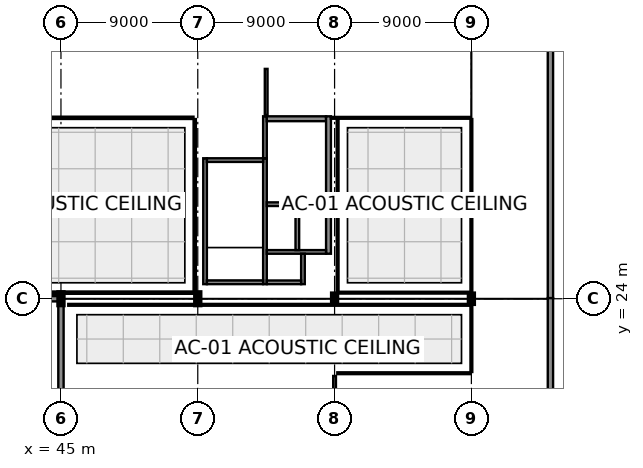
"""IFC4 building model, lengths in metres.
Left out: names, types, materials, properties, quantities, classifications, styles, units other than length and angle.
Written with IfcOpenShell. Run it as: python <this file> out.ifc"""

import sys

from ifc_helpers import new_model, si_unit, direction, frame, frame_2d, origin, origin_2d, place, context, subcontext, project, spatial, rectangle, i_section, extrude, element, fill, save


model = new_model("IFC4")
c1 = context("Model", 3, precision=1e-05, world=origin(), true_north=direction((0.0, 1.0)))
c2 = subcontext(c1, "Body", "Model", "MODEL_VIEW")
j1 = project(units=[si_unit("LENGTHUNIT", "METRE"), si_unit("PLANEANGLEUNIT", "RADIAN")], contexts=[c1])
p1 = place(None, origin())
s1 = spatial("IfcSite", under=j1, at=p1, CompositionType="ELEMENT")
p2 = place(p1, origin())
s2 = spatial("IfcBuilding", under=s1, at=p2, CompositionType="ELEMENT")
p3 = place(p2, origin())
s3 = spatial("IfcBuildingStorey", under=s2, at=p3, CompositionType="ELEMENT", Elevation=0.0)
for number, where, z_axis, x_axis in (
    (1, (45.0, 24.0, 0.0), (0.0, 0.0, 1.0), (1.0, 0.0, 0.0)),
    (2, (54.0, 24.0, 0.0), (0.0, 0.0, 1.0), (0.0, 1.0, 0.0)),
):
    element("IfcColumn", number, at=place(p3, frame(where, z_axis=z_axis, x_axis=x_axis)), inside=s3, PredefinedType="COLUMN", context=c2, shape_type="SweptSolid", body=[
        extrude(i_section(OverallWidth=0.303, OverallDepth=0.814, WebThickness=0.021, FlangeThickness=0.04, at=origin_2d()), origin(), (0.0, 0.0, 1.0), 5.4),
    ])
for number, where, z_axis, x_axis in (
    (3, (63.0, 24.0, 0.0), (0.0, 0.0, 1.0), (1.0, 0.0, 0.0)),
    (4, (72.0, 24.0, 0.0), (0.0, 0.0, 1.0), (1.0, 0.0, 0.0)),
):
    element("IfcColumn", number, at=place(p3, frame(where, z_axis=z_axis, x_axis=x_axis)), inside=s3, PredefinedType="COLUMN", context=c2, shape_type="SweptSolid", body=[
        extrude(i_section(OverallWidth=0.3, OverallDepth=0.65, WebThickness=0.016, FlangeThickness=0.031, at=origin_2d()), origin(), (0.0, 0.0, 1.0), 5.4),
    ])
p4 = place(p3, frame((35.99, 24.0, 0.0), z_axis=(0.0, 0.0, 1.0), x_axis=(1.0, 0.0, 0.0)))
e5 = element("IfcWall", 5, at=p4, inside=s3, PredefinedType="SOLIDWALL", context=c2, shape_type="SweptSolid", body=[
    extrude(rectangle(XDim=9.002, YDim=0.35, at=frame_2d((4.501, 0.0))), origin(), (0.0, 0.0, 1.0), 4.047),
])
p5 = place(p4, frame((1.521, 0.0, 0.85)))
e6 = element("IfcOpeningElement", 6, at=p5, cuts=e5, PredefinedType="OPENING", context=c2, shape_type="SweptSolid", body=[
    extrude(rectangle(XDim=2.0, YDim=2.0, at=frame_2d((1.0, 1.0))), frame((0.0, 0.19, 0.0), z_axis=(0.0, -1.0, 0.0), x_axis=(1.0, 0.0, 0.0)), (0.0, 0.0, 1.0), 0.38),
])
p6 = place(p4, frame((5.481, 0.0, 0.85)))
e7 = element("IfcOpeningElement", 7, at=p6, cuts=e5, PredefinedType="OPENING", context=c2, shape_type="SweptSolid", body=[
    extrude(rectangle(XDim=2.0, YDim=2.0, at=frame_2d((1.0, 1.0))), frame((0.0, 0.19, 0.0), z_axis=(0.0, -1.0, 0.0), x_axis=(1.0, 0.0, 0.0)), (0.0, 0.0, 1.0), 0.38),
])
p7 = place(p3, frame((77.2, 24.04, 0.0), z_axis=(0.0, 0.0, 1.0), x_axis=(0.0, 1.0, 0.0)))
e8 = element("IfcWall", 8, at=p7, inside=s3, PredefinedType="SOLIDWALL", context=c2, shape_type="SweptSolid", body=[
    extrude(rectangle(XDim=17.97, YDim=0.35, at=frame_2d((8.985, 0.0))), origin(), (0.0, 0.0, 1.0), 5.08),
])
p8 = place(p7, frame((12.66, 0.0, 0.0)))
e9 = element("IfcOpeningElement", 9, at=p8, cuts=e8, PredefinedType="OPENING", context=c2, shape_type="SweptSolid", body=[
    extrude(rectangle(XDim=1.8, YDim=2.4, at=frame_2d((0.9, 1.2))), frame((0.0, 0.19, 0.0), z_axis=(0.0, -1.0, 0.0), x_axis=(1.0, 0.0, 0.0)), (0.0, 0.0, 1.0), 0.38),
])
p9 = place(p3, frame((77.2, 11.99, 0.0), z_axis=(0.0, 0.0, 1.0), x_axis=(0.0, 1.0, 0.0)))
e10 = element("IfcWall", 10, at=p9, inside=s3, PredefinedType="SOLIDWALL", context=c2, shape_type="SweptSolid", body=[
    extrude(rectangle(XDim=12.05, YDim=0.35, at=frame_2d((6.025, 0.0))), origin(), (0.0, 0.0, 1.0), 5.08),
])
p10 = place(p9, frame((2.07, 0.0, 0.85)))
e11 = element("IfcOpeningElement", 11, at=p10, cuts=e10, PredefinedType="OPENING", context=c2, shape_type="SweptSolid", body=[
    extrude(rectangle(XDim=1.4, YDim=1.4, at=frame_2d((0.7, 0.7))), frame((0.0, 0.19, 0.0), z_axis=(0.0, -1.0, 0.0), x_axis=(1.0, 0.0, 0.0)), (0.0, 0.0, 1.0), 0.38),
])
p11 = place(p9, frame((7.735, 0.0, 0.85)))
e12 = element("IfcOpeningElement", 12, at=p11, cuts=e10, PredefinedType="OPENING", context=c2, shape_type="SweptSolid", body=[
    extrude(rectangle(XDim=1.4, YDim=1.4, at=frame_2d((0.7, 0.7))), frame((0.0, 0.19, 0.0), z_axis=(0.0, -1.0, 0.0), x_axis=(1.0, 0.0, 0.0)), (0.0, 0.0, 1.0), 0.38),
])
p12 = place(p3, frame((45.0, 23.595, 0.0), z_axis=(0.0, 0.0, 1.0), x_axis=(0.0, -1.0, 0.0)))
e13 = element("IfcWall", 13, at=p12, inside=s3, PredefinedType="SOLIDWALL", context=c2, shape_type="SweptSolid", body=[
    extrude(rectangle(XDim=11.19, YDim=0.35, at=frame_2d((5.595, 0.0))), origin(), (0.0, 0.0, 1.0), 4.725),
])
p13 = place(p12, frame((4.595, 0.0, 0.0)))
e14 = element("IfcOpeningElement", 14, at=p13, cuts=e13, PredefinedType="OPENING", context=c2, shape_type="SweptSolid", body=[
    extrude(rectangle(XDim=2.4, YDim=2.8, at=frame_2d((1.2, 1.4))), frame((0.0, 0.19, 0.0), z_axis=(0.0, -1.0, 0.0), x_axis=(1.0, 0.0, 0.0)), (0.0, 0.0, 1.0), 0.38),
])
p14 = place(p12, frame((8.09, 0.0, 0.0)))
e15 = element("IfcOpeningElement", 15, at=p14, cuts=e13, PredefinedType="OPENING", context=c2, shape_type="SweptSolid", body=[
    extrude(rectangle(XDim=1.8, YDim=2.4, at=frame_2d((0.9, 1.2))), frame((0.0, 0.19, 0.0), z_axis=(0.0, -1.0, 0.0), x_axis=(1.0, 0.0, 0.0)), (0.0, 0.0, 1.0), 0.38),
])
p15 = place(p3, frame((54.48, 24.96, 0.0), z_axis=(0.0, 0.0, 1.0), x_axis=(0.0, 1.0, 0.0)))
e16 = element("IfcWall", 16, at=p15, inside=s3, PredefinedType="SHEAR", context=c2, shape_type="SweptSolid", body=[
    extrude(rectangle(XDim=8.28, YDim=0.24, at=frame_2d((4.14, 0.0))), origin(), (0.0, 0.0, 1.0), 5.21),
])
p16 = place(p3, frame((58.42, 24.96, 0.0), z_axis=(0.0, 0.0, 1.0), x_axis=(0.0, 1.0, 0.0)))
e17 = element("IfcWall", 17, at=p16, inside=s3, PredefinedType="SHEAR", context=c2, shape_type="SweptSolid", body=[
    extrude(rectangle(XDim=8.28, YDim=0.24, at=frame_2d((4.14, 0.0))), origin(), (0.0, 0.0, 1.0), 5.21),
])
p17 = place(p16, frame((6.49, 0.0, 0.0)))
e18 = element("IfcOpeningElement", 18, at=p17, cuts=e17, PredefinedType="OPENING", context=c2, shape_type="SweptSolid", body=[
    extrude(rectangle(XDim=1.3, YDim=2.2, at=frame_2d((0.65, 1.1))), frame((0.0, 0.135, 0.0), z_axis=(0.0, -1.0, 0.0), x_axis=(1.0, 0.0, 0.0)), (0.0, 0.0, 1.0), 0.27),
])
for number, where, z_axis, x_axis in (
    (19, (54.6, 25.08, 0.0), (0.0, 0.0, 1.0), (1.0, 0.0, 0.0)),
    (20, (54.6, 33.12, 0.0), (0.0, 0.0, 1.0), (1.0, 0.0, 0.0)),
):
    element("IfcWall", number, at=place(p3, frame(where, z_axis=z_axis, x_axis=x_axis)), inside=s3, PredefinedType="SHEAR", context=c2, shape_type="SweptSolid", body=[
        extrude(rectangle(XDim=3.7, YDim=0.24, at=frame_2d((1.85, 0.0))), origin(), (0.0, 0.0, 1.0), 5.21),
    ])
p18 = place(p3, frame((58.42, 33.24, 0.0), z_axis=(0.0, 0.0, 1.0), x_axis=(0.0, 1.0, 0.0)))
e21 = element("IfcWall", 21, at=p18, inside=s3, PredefinedType="SHEAR", context=c2, shape_type="SweptSolid", body=[
    extrude(rectangle(XDim=2.76, YDim=0.24, at=frame_2d((1.38, 0.0))), origin(), (0.0, 0.0, 1.0), 5.06),
])
p19 = place(p3, frame((58.54, 35.84, 0.0), z_axis=(0.0, 0.0, 1.0), x_axis=(1.0, 0.0, 0.0)))
e22 = element("IfcWall", 22, at=p19, inside=s3, PredefinedType="SHEAR", context=c2, shape_type="SweptSolid", body=[
    extrude(rectangle(XDim=3.9, YDim=0.32, at=frame_2d((1.95, 0.0))), origin(), (0.0, 0.0, 1.0), 5.06),
])
p20 = place(p19, frame((1.225, 0.0, 0.0)))
e23 = element("IfcOpeningElement", 23, at=p20, cuts=e22, PredefinedType="OPENING", context=c2, shape_type="SweptSolid", body=[
    extrude(rectangle(XDim=1.45, YDim=2.2, at=frame_2d((0.725, 1.1))), frame((0.0, 0.175, 0.0), z_axis=(0.0, -1.0, 0.0), x_axis=(1.0, 0.0, 0.0)), (0.0, 0.0, 1.0), 0.35),
])
p21 = place(p3, frame((62.6, 26.96, 0.0), z_axis=(0.0, 0.0, 1.0), x_axis=(0.0, 1.0, 0.0)))
e24 = element("IfcWall", 24, at=p21, inside=s3, PredefinedType="SHEAR", context=c2, shape_type="SweptSolid", body=[
    extrude(rectangle(XDim=9.04, YDim=0.32, at=frame_2d((4.52, 0.0))), origin(), (0.0, 0.0, 1.0), 5.06),
])
p22 = place(p3, frame((58.54, 30.22, 0.0), z_axis=(0.0, 0.0, 1.0), x_axis=(1.0, 0.0, 0.0)))
e25 = element("IfcWall", 25, at=p22, inside=s3, PredefinedType="SHEAR", context=c2, shape_type="SweptSolid", body=[
    extrude(rectangle(XDim=3.9, YDim=0.24, at=frame_2d((1.95, 0.0))), origin(), (0.0, 0.0, 1.0), 5.21),
])
p23 = place(p22, frame((0.385, 0.0, 0.0)))
e26 = element("IfcOpeningElement", 26, at=p23, cuts=e25, PredefinedType="OPENING", context=c2, shape_type="SweptSolid", body=[
    extrude(rectangle(XDim=1.3, YDim=2.2, at=frame_2d((0.65, 1.1))), frame((0.0, 0.135, 0.0), z_axis=(0.0, -1.0, 0.0), x_axis=(1.0, 0.0, 0.0)), (0.0, 0.0, 1.0), 0.27),
])
p24 = place(p22, frame((2.335, 0.0, 0.0)))
e27 = element("IfcOpeningElement", 27, at=p24, cuts=e25, PredefinedType="OPENING", context=c2, shape_type="SweptSolid", body=[
    extrude(rectangle(XDim=1.3, YDim=2.2, at=frame_2d((0.65, 1.1))), frame((0.0, 0.135, 0.0), z_axis=(0.0, -1.0, 0.0), x_axis=(1.0, 0.0, 0.0)), (0.0, 0.0, 1.0), 0.27),
])
p25 = place(p3, frame((58.54, 27.08, 0.0), z_axis=(0.0, 0.0, 1.0), x_axis=(1.0, 0.0, 0.0)))
e28 = element("IfcWall", 28, at=p25, inside=s3, PredefinedType="SHEAR", context=c2, shape_type="SweptSolid", body=[
    extrude(rectangle(XDim=3.9, YDim=0.24, at=frame_2d((1.95, 0.0))), origin(), (0.0, 0.0, 1.0), 5.21),
])
p26 = place(p3, frame((60.55, 27.2, 0.0), z_axis=(0.0, 0.0, 1.0), x_axis=(0.0, 1.0, 0.0)))
e29 = element("IfcWall", 29, at=p26, inside=s3, PredefinedType="SHEAR", context=c2, shape_type="SweptSolid", body=[
    extrude(rectangle(XDim=2.9, YDim=0.24, at=frame_2d((1.45, 0.0))), origin(), (0.0, 0.0, 1.0), 5.21),
])
p27 = place(p3, frame((60.92, 24.96, 0.0), z_axis=(0.0, 0.0, 1.0), x_axis=(0.0, 1.0, 0.0)))
e30 = element("IfcWall", 30, at=p27, inside=s3, PredefinedType="SHEAR", context=c2, shape_type="SweptSolid", body=[
    extrude(rectangle(XDim=2.0, YDim=0.24, at=frame_2d((1.0, 0.0))), origin(), (0.0, 0.0, 1.0), 5.21),
])
p28 = place(p3, frame((58.54, 25.08, 0.0), z_axis=(0.0, 0.0, 1.0), x_axis=(1.0, 0.0, 0.0)))
e31 = element("IfcWall", 31, at=p28, inside=s3, PredefinedType="SHEAR", context=c2, shape_type="SweptSolid", body=[
    extrude(rectangle(XDim=2.26, YDim=0.24, at=frame_2d((1.13, 0.0))), origin(), (0.0, 0.0, 1.0), 5.21),
])
p29 = place(p3, frame((63.0, 18.92, 0.0), z_axis=(0.0, 0.0, 1.0), x_axis=(0.0, -1.0, 0.0)))
e32 = element("IfcWall", 32, at=p29, inside=s3, PredefinedType="PARTITIONING", context=c2, shape_type="SweptSolid", body=[
    extrude(rectangle(XDim=3.04, YDim=0.18, at=frame_2d((1.52, 0.0))), origin(), (0.0, 0.0, 1.0), 4.635),
])
p30 = place(p29, frame((0.795, 0.0, 0.0)))
e33 = element("IfcOpeningElement", 33, at=p30, cuts=e32, PredefinedType="OPENING", context=c2, shape_type="SweptSolid", body=[
    extrude(rectangle(XDim=1.45, YDim=2.2, at=frame_2d((0.725, 1.1))), frame((0.0, 0.105, 0.0), z_axis=(0.0, -1.0, 0.0), x_axis=(1.0, 0.0, 0.0)), (0.0, 0.0, 1.0), 0.21),
])
p31 = place(p3, frame((58.5, 36.08, 0.0), z_axis=(0.0, 0.0, 1.0), x_axis=(0.0, 1.0, 0.0)))
e34 = element("IfcWall", 34, at=p31, inside=s3, PredefinedType="PARTITIONING", context=c2, shape_type="SweptSolid", body=[
    extrude(rectangle(XDim=3.04, YDim=0.18, at=frame_2d((1.52, 0.0))), origin(), (0.0, 0.0, 1.0), 5.04),
])
p32 = place(p31, frame((0.795, 0.0, 0.0)))
e35 = element("IfcOpeningElement", 35, at=p32, cuts=e34, PredefinedType="OPENING", context=c2, shape_type="SweptSolid", body=[
    extrude(rectangle(XDim=1.45, YDim=2.2, at=frame_2d((0.725, 1.1))), frame((0.0, 0.105, 0.0), z_axis=(0.0, -1.0, 0.0), x_axis=(1.0, 0.0, 0.0)), (0.0, 0.0, 1.0), 0.21),
])
p33 = place(p3, frame((53.8, 35.82, 0.0), z_axis=(0.0, 0.0, 1.0), x_axis=(0.0, -1.0, 0.0)))
e36 = element("IfcWall", 36, at=p33, inside=s3, PredefinedType="PARTITIONING", context=c2, shape_type="SweptSolid", body=[
    extrude(rectangle(XDim=11.34, YDim=0.15, at=frame_2d((5.67, 0.0))), origin(), (0.0, 0.0, 1.0), 4.365),
])
p34 = place(p3, frame((53.72, 24.4, 0.0), z_axis=(0.0, 0.0, 1.0), x_axis=(-1.0, 0.0, 0.0)))
e37 = element("IfcWall", 37, at=p34, inside=s3, PredefinedType="PARTITIONING", context=c2, shape_type="SweptSolid", body=[
    extrude(rectangle(XDim=17.865, YDim=0.15, at=frame_2d((8.933, 0.0))), origin(), (0.0, 0.0, 1.0), 5.04),
])
p35 = place(p3, frame((35.98, 35.9, 0.0), z_axis=(0.0, 0.0, 1.0), x_axis=(1.0, 0.0, 0.0)))
e38 = element("IfcWall", 38, at=p35, inside=s3, PredefinedType="PARTITIONING", context=c2, shape_type="SweptSolid", body=[
    extrude(rectangle(XDim=17.74, YDim=0.15, at=frame_2d((8.87, 0.0))), origin(), (0.0, 0.0, 1.0), 5.04),
])
p36 = place(p35, frame((8.345, 0.0, 0.0)))
e39 = element("IfcOpeningElement", 39, at=p36, cuts=e38, PredefinedType="OPENING", context=c2, shape_type="SweptSolid", body=[
    extrude(rectangle(XDim=1.05, YDim=2.25, at=frame_2d((0.525, 1.125))), frame((0.0, 0.09, 0.0), z_axis=(0.0, -1.0, 0.0), x_axis=(1.0, 0.0, 0.0)), (0.0, 0.0, 1.0), 0.18),
])
p37 = place(p35, frame((15.09, 0.0, 1.05)))
e40 = element("IfcOpeningElement", 40, at=p37, cuts=e38, PredefinedType="OPENING", context=c2, shape_type="SweptSolid", body=[
    extrude(rectangle(XDim=1.8, YDim=1.1, at=frame_2d((0.9, 0.55))), frame((0.0, 0.09, 0.0), z_axis=(0.0, -1.0, 0.0), x_axis=(1.0, 0.0, 0.0)), (0.0, 0.0, 1.0), 0.18),
])
p38 = place(p3, frame((72.0, 35.82, 0.0), z_axis=(0.0, 0.0, 1.0), x_axis=(0.0, -1.0, 0.0)))
e41 = element("IfcWall", 41, at=p38, inside=s3, PredefinedType="PARTITIONING", context=c2, shape_type="SweptSolid", body=[
    extrude(rectangle(XDim=11.34, YDim=0.12, at=frame_2d((5.67, 0.0))), origin(), (0.0, 0.0, 1.0), 4.255),
])
p39 = place(p38, frame((5.195, 0.0, 0.0)))
e42 = element("IfcOpeningElement", 42, at=p39, cuts=e41, PredefinedType="OPENING", context=c2, shape_type="SweptSolid", body=[
    extrude(rectangle(XDim=0.95, YDim=2.15, at=frame_2d((0.475, 1.075))), frame((0.0, 0.075, 0.0), z_axis=(0.0, -1.0, 0.0), x_axis=(1.0, 0.0, 0.0)), (0.0, 0.0, 1.0), 0.15),
])
p40 = place(p38, frame((8.99, 0.0, 1.05)))
e43 = element("IfcOpeningElement", 43, at=p40, cuts=e41, PredefinedType="OPENING", context=c2, shape_type="SweptSolid", body=[
    extrude(rectangle(XDim=1.5, YDim=1.1, at=frame_2d((0.75, 0.55))), frame((0.0, 0.075, 0.0), z_axis=(0.0, -1.0, 0.0), x_axis=(1.0, 0.0, 0.0)), (0.0, 0.0, 1.0), 0.15),
])
p41 = place(p3, frame((71.92, 24.4, 0.0), z_axis=(0.0, 0.0, 1.0), x_axis=(-1.0, 0.0, 0.0)))
e44 = element("IfcWall", 44, at=p41, inside=s3, PredefinedType="PARTITIONING", context=c2, shape_type="SweptSolid", body=[
    extrude(rectangle(XDim=8.64, YDim=0.12, at=frame_2d((4.32, 0.0))), origin(), (0.0, 0.0, 1.0), 5.04),
])
p42 = place(p3, frame((63.2, 24.48, 0.0), z_axis=(0.0, 0.0, 1.0), x_axis=(0.0, 1.0, 0.0)))
e45 = element("IfcWall", 45, at=p42, inside=s3, PredefinedType="PARTITIONING", context=c2, shape_type="SweptSolid", body=[
    extrude(rectangle(XDim=11.34, YDim=0.12, at=frame_2d((5.67, 0.0))), origin(), (0.0, 0.0, 1.0), 4.265),
])
p43 = place(p3, frame((62.755, 35.9, 0.0), z_axis=(0.0, 0.0, 1.0), x_axis=(1.0, 0.0, 0.0)))
e46 = element("IfcWall", 46, at=p43, inside=s3, PredefinedType="PARTITIONING", context=c2, shape_type="SweptSolid", body=[
    extrude(rectangle(XDim=9.165, YDim=0.12, at=frame_2d((4.583, 0.0))), origin(), (0.0, 0.0, 1.0), 5.04),
])
p44 = place(p3, frame((45.48, 23.6, 0.0), z_axis=(0.0, 0.0, 1.0), x_axis=(1.0, 0.0, 0.0)))
e47 = element("IfcWall", 47, at=p44, inside=s3, PredefinedType="PARTITIONING", context=c2, shape_type="SweptSolid", body=[
    extrude(rectangle(XDim=26.44, YDim=0.12, at=frame_2d((13.22, 0.0))), origin(), (0.0, 0.0, 1.0), 5.04),
])
p45 = place(p3, frame((72.0, 23.52, 0.0), z_axis=(0.0, 0.0, 1.0), x_axis=(0.0, -1.0, 0.0)))
e48 = element("IfcWall", 48, at=p45, inside=s3, PredefinedType="PARTITIONING", context=c2, shape_type="SweptSolid", body=[
    extrude(rectangle(XDim=4.34, YDim=0.12, at=frame_2d((2.17, 0.0))), origin(), (0.0, 0.0, 1.0), 4.585),
])
p46 = place(p3, frame((71.92, 19.1, 0.0), z_axis=(0.0, 0.0, 1.0), x_axis=(-1.0, 0.0, 0.0)))
e49 = element("IfcWall", 49, at=p46, inside=s3, PredefinedType="PARTITIONING", context=c2, shape_type="SweptSolid", body=[
    extrude(rectangle(XDim=8.74, YDim=0.12, at=frame_2d((4.37, 0.0))), origin(), (0.0, 0.0, 1.0), 5.04),
])
p47 = place(p46, frame((3.895, 0.0, 0.0)))
e50 = element("IfcOpeningElement", 50, at=p47, cuts=e49, PredefinedType="OPENING", context=c2, shape_type="SweptSolid", body=[
    extrude(rectangle(XDim=0.95, YDim=2.15, at=frame_2d((0.475, 1.075))), frame((0.0, 0.075, 0.0), z_axis=(0.0, -1.0, 0.0), x_axis=(1.0, 0.0, 0.0)), (0.0, 0.0, 1.0), 0.15),
])
p48 = place(p46, frame((5.79, 0.0, 1.05)))
e51 = element("IfcOpeningElement", 51, at=p48, cuts=e49, PredefinedType="OPENING", context=c2, shape_type="SweptSolid", body=[
    extrude(rectangle(XDim=2.1, YDim=1.2, at=frame_2d((1.05, 0.6))), frame((0.0, 0.075, 0.0), z_axis=(0.0, -1.0, 0.0), x_axis=(1.0, 0.0, 0.0)), (0.0, 0.0, 1.0), 0.15),
])
p49 = place(p13, frame((2.4, 0.0, 0.0), z_axis=(0.0, 0.0, 1.0), x_axis=(-1.0, 0.0, 0.0)))
e52 = element("IfcDoor", 52, at=p49, inside=s3, OperationType="DOUBLE_DOOR_SINGLE_SWING", PredefinedType="DOOR", context=c2, shape_type="SweptSolid", body=[
    extrude(rectangle(XDim=2.4, YDim=2.8, at=frame_2d((1.2, 1.4))), frame((0.0, 0.025, 0.0), z_axis=(0.0, -1.0, 0.0), x_axis=(1.0, 0.0, 0.0)), (0.0, 0.0, 1.0), 0.05),
])
fill(e14, e52)
p50 = place(p8, frame((1.8, 0.0, 0.0), z_axis=(0.0, 0.0, 1.0), x_axis=(-1.0, 0.0, 0.0)))
e53 = element("IfcDoor", 53, at=p50, inside=s3, OperationType="DOUBLE_DOOR_SINGLE_SWING", PredefinedType="DOOR", context=c2, shape_type="SweptSolid", body=[
    extrude(rectangle(XDim=1.8, YDim=2.4, at=frame_2d((0.9, 1.2))), frame((0.0, 0.025, 0.0), z_axis=(0.0, -1.0, 0.0), x_axis=(1.0, 0.0, 0.0)), (0.0, 0.0, 1.0), 0.05),
])
fill(e9, e53)
p51 = place(p11, origin())
e54 = element("IfcWindow", 54, at=p51, inside=s3, PartitioningType="SINGLE_PANEL", PredefinedType="WINDOW", context=c2, shape_type="SweptSolid", body=[
    extrude(rectangle(XDim=1.4, YDim=1.4, at=frame_2d((0.7, 0.7))), frame((0.0, 0.03, 0.0), z_axis=(0.0, -1.0, 0.0), x_axis=(1.0, 0.0, 0.0)), (0.0, 0.0, 1.0), 0.06),
])
fill(e12, e54)
p52 = place(p17, frame((1.3, 0.0, 0.0), z_axis=(0.0, 0.0, 1.0), x_axis=(-1.0, 0.0, 0.0)))
e55 = element("IfcDoor", 55, at=p52, inside=s3, OperationType="SINGLE_SWING_RIGHT", PredefinedType="DOOR", context=c2, shape_type="SweptSolid", body=[
    extrude(rectangle(XDim=1.3, YDim=2.2, at=frame_2d((0.65, 1.1))), frame((0.0, 0.025, 0.0), z_axis=(0.0, -1.0, 0.0), x_axis=(1.0, 0.0, 0.0)), (0.0, 0.0, 1.0), 0.05),
])
fill(e18, e55)
p53 = place(p20, origin())
e56 = element("IfcDoor", 56, at=p53, inside=s3, OperationType="DOUBLE_DOOR_SINGLE_SWING", PredefinedType="DOOR", context=c2, shape_type="SweptSolid", body=[
    extrude(rectangle(XDim=1.45, YDim=2.2, at=frame_2d((0.725, 1.1))), frame((0.0, 0.025, 0.0), z_axis=(0.0, -1.0, 0.0), x_axis=(1.0, 0.0, 0.0)), (0.0, 0.0, 1.0), 0.05),
])
fill(e23, e56)
p54 = place(p23, origin())
e57 = element("IfcDoor", 57, at=p54, inside=s3, OperationType="DOUBLE_DOOR_SLIDING", PredefinedType="DOOR", context=c2, shape_type="SweptSolid", body=[
    extrude(rectangle(XDim=1.3, YDim=2.2, at=frame_2d((0.65, 1.1))), frame((0.0, 0.025, 0.0), z_axis=(0.0, -1.0, 0.0), x_axis=(1.0, 0.0, 0.0)), (0.0, 0.0, 1.0), 0.05),
])
fill(e26, e57)
p55 = place(p24, origin())
e58 = element("IfcDoor", 58, at=p55, inside=s3, OperationType="DOUBLE_DOOR_SLIDING", PredefinedType="DOOR", context=c2, shape_type="SweptSolid", body=[
    extrude(rectangle(XDim=1.3, YDim=2.2, at=frame_2d((0.65, 1.1))), frame((0.0, 0.025, 0.0), z_axis=(0.0, -1.0, 0.0), x_axis=(1.0, 0.0, 0.0)), (0.0, 0.0, 1.0), 0.05),
])
fill(e27, e58)
p56 = place(p30, origin())
e59 = element("IfcDoor", 59, at=p56, inside=s3, OperationType="DOUBLE_DOOR_SINGLE_SWING", PredefinedType="DOOR", context=c2, shape_type="SweptSolid", body=[
    extrude(rectangle(XDim=1.45, YDim=2.2, at=frame_2d((0.725, 1.1))), frame((0.0, 0.025, 0.0), z_axis=(0.0, -1.0, 0.0), x_axis=(1.0, 0.0, 0.0)), (0.0, 0.0, 1.0), 0.05),
])
fill(e33, e59)
p57 = place(p32, origin())
e60 = element("IfcDoor", 60, at=p57, inside=s3, OperationType="DOUBLE_DOOR_SINGLE_SWING", PredefinedType="DOOR", context=c2, shape_type="SweptSolid", body=[
    extrude(rectangle(XDim=1.45, YDim=2.2, at=frame_2d((0.725, 1.1))), frame((0.0, 0.025, 0.0), z_axis=(0.0, -1.0, 0.0), x_axis=(1.0, 0.0, 0.0)), (0.0, 0.0, 1.0), 0.05),
])
fill(e35, e60)
p58 = place(p36, frame((1.05, 0.0, 0.0), z_axis=(0.0, 0.0, 1.0), x_axis=(-1.0, 0.0, 0.0)))
e61 = element("IfcDoor", 61, at=p58, inside=s3, OperationType="SINGLE_SWING_RIGHT", PredefinedType="DOOR", context=c2, shape_type="SweptSolid", body=[
    extrude(rectangle(XDim=1.05, YDim=2.25, at=frame_2d((0.525, 1.125))), frame((0.0, 0.025, 0.0), z_axis=(0.0, -1.0, 0.0), x_axis=(1.0, 0.0, 0.0)), (0.0, 0.0, 1.0), 0.05),
])
fill(e39, e61)
p59 = place(p37, origin())
e62 = element("IfcWindow", 62, at=p59, inside=s3, PartitioningType="SINGLE_PANEL", PredefinedType="WINDOW", context=c2, shape_type="SweptSolid", body=[
    extrude(rectangle(XDim=1.8, YDim=1.1, at=frame_2d((0.9, 0.55))), frame((0.0, 0.03, 0.0), z_axis=(0.0, -1.0, 0.0), x_axis=(1.0, 0.0, 0.0)), (0.0, 0.0, 1.0), 0.06),
])
fill(e40, e62)
p60 = place(p39, origin())
e63 = element("IfcDoor", 63, at=p60, inside=s3, OperationType="SINGLE_SWING_LEFT", PredefinedType="DOOR", context=c2, shape_type="SweptSolid", body=[
    extrude(rectangle(XDim=0.95, YDim=2.15, at=frame_2d((0.475, 1.075))), frame((0.0, 0.025, 0.0), z_axis=(0.0, -1.0, 0.0), x_axis=(1.0, 0.0, 0.0)), (0.0, 0.0, 1.0), 0.05),
])
fill(e42, e63)
p61 = place(p40, origin())
e64 = element("IfcWindow", 64, at=p61, inside=s3, PartitioningType="SINGLE_PANEL", PredefinedType="WINDOW", context=c2, shape_type="SweptSolid", body=[
    extrude(rectangle(XDim=1.5, YDim=1.1, at=frame_2d((0.75, 0.55))), frame((0.0, 0.03, 0.0), z_axis=(0.0, -1.0, 0.0), x_axis=(1.0, 0.0, 0.0)), (0.0, 0.0, 1.0), 0.06),
])
fill(e43, e64)
p62 = place(p47, frame((0.95, 0.0, 0.0), z_axis=(0.0, 0.0, 1.0), x_axis=(-1.0, 0.0, 0.0)))
e65 = element("IfcDoor", 65, at=p62, inside=s3, OperationType="SINGLE_SWING_LEFT", PredefinedType="DOOR", context=c2, shape_type="SweptSolid", body=[
    extrude(rectangle(XDim=0.95, YDim=2.15, at=frame_2d((0.475, 1.075))), frame((0.0, 0.025, 0.0), z_axis=(0.0, -1.0, 0.0), x_axis=(1.0, 0.0, 0.0)), (0.0, 0.0, 1.0), 0.05),
])
fill(e50, e65)
p63 = place(p48, origin())
e66 = element("IfcWindow", 66, at=p63, inside=s3, PartitioningType="SINGLE_PANEL", PredefinedType="WINDOW", context=c2, shape_type="SweptSolid", body=[
    extrude(rectangle(XDim=2.1, YDim=1.2, at=frame_2d((1.05, 0.6))), frame((0.0, 0.03, 0.0), z_axis=(0.0, -1.0, 0.0), x_axis=(1.0, 0.0, 0.0)), (0.0, 0.0, 1.0), 0.06),
])
fill(e51, e66)
save(model, sys.argv[1])
